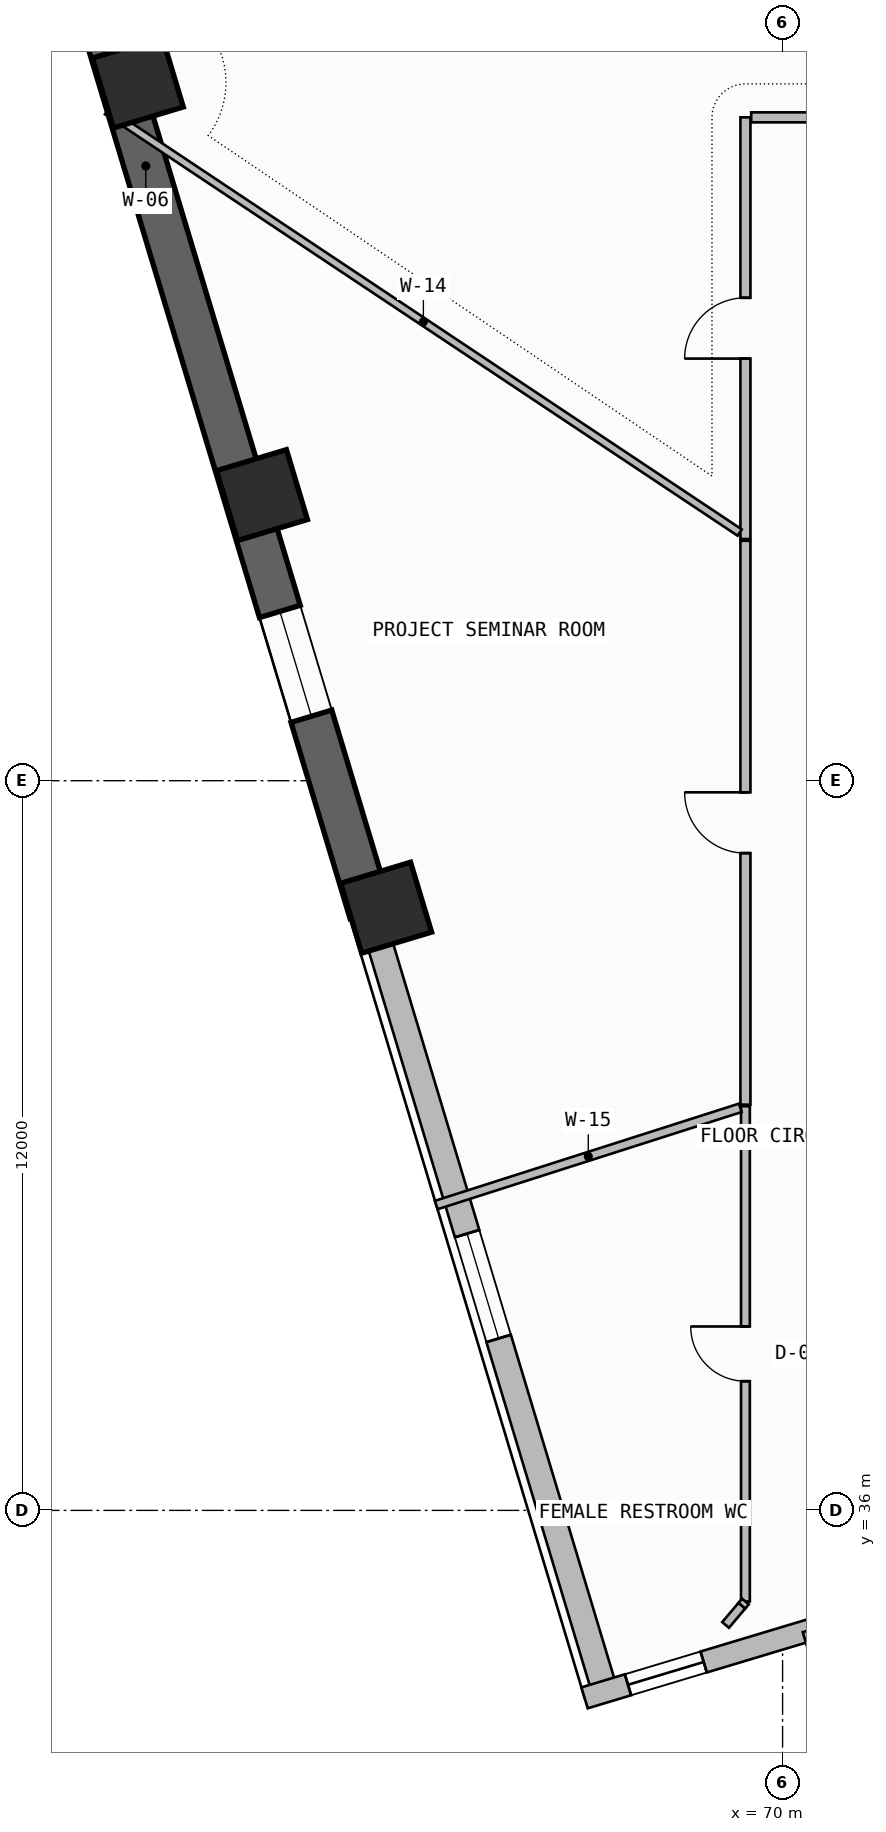
"""IFC4 building model, lengths in metres.
Left out: names, types, materials, properties, quantities, classifications, styles, units other than length and angle.
Written with IfcOpenShell. Run it as: python <this file> out.ifc"""

import sys

from ifc_helpers import new_model, si_unit, direction, frame, frame_2d, origin, origin_2d, place, context, subcontext, project, spatial, rectangle, extrude, element, fill, save


model = new_model("IFC4")
c1 = context("Model", 3, precision=1e-05, world=origin(), true_north=direction((0.0, 1.0)))
c2 = subcontext(c1, "Body", "Model", "MODEL_VIEW")
j1 = project(units=[si_unit("LENGTHUNIT", "METRE"), si_unit("PLANEANGLEUNIT", "RADIAN")], contexts=[c1])
p1 = place(None, origin())
s1 = spatial("IfcSite", under=j1, at=p1, CompositionType="ELEMENT")
p2 = place(p1, origin())
s2 = spatial("IfcBuilding", under=s1, at=p2, CompositionType="ELEMENT")
p3 = place(p2, frame((0.0, 0.0, 135.9)))
s3 = spatial("IfcBuildingStorey", under=s2, at=p3, CompositionType="ELEMENT", Elevation=135.9)
for number, where, z_axis, x_axis in (
    (1, (59.396, 59.481, 0.0), (0.0, 0.0, 1.0), (-0.288, 0.958, 0.0)),
    (2, (61.438, 52.696, 0.0), (0.0, 0.0, 1.0), (-0.288, 0.958, 0.0)),
    (3, (63.48, 45.912, 0.0), (0.0, 0.0, 1.0), (-0.288, 0.958, 0.0)),
):
    element("IfcColumn", number, at=place(p3, frame(where, z_axis=z_axis, x_axis=x_axis)), inside=s3, PredefinedType="COLUMN", context=c2, shape_type="SweptSolid", body=[
        extrude(rectangle(XDim=1.2, YDim=1.2, at=origin_2d()), origin(), (0.0, 0.0, 1.0), 3.6),
    ])
p4 = place(p3, frame((57.323, 65.434, -0.26), z_axis=(0.0, 0.0, 1.0), x_axis=(0.288188159352, -0.957573801234, 0.0)))
e4 = element("IfcWall", 4, at=p4, inside=s3, PredefinedType="SHEAR", context=c2, shape_type="SweptSolid", body=[
    extrude(rectangle(XDim=20.469, YDim=0.7, at=frame_2d((10.234, 0.0))), origin(), (0.0, 0.0, 1.0), 3.6),
])
p5 = place(p4, frame((15.3, 0.0, 1.2)))
e5 = element("IfcOpeningElement", 5, at=p5, cuts=e4, PredefinedType="OPENING", context=c2, shape_type="SweptSolid", body=[
    extrude(rectangle(XDim=1.8, YDim=0.9, at=frame_2d((0.9, 0.45))), frame((0.0, 0.36, 0.0), z_axis=(0.0, -1.0, 0.0), x_axis=(1.0, 0.0, 0.0)), (0.0, 0.0, 1.0), 0.72),
])
p6 = place(p3, frame((63.221, 45.834, 0.0), z_axis=(0.0, 0.0, 1.0), x_axis=(0.288202962273, -0.957569346072, 0.0)))
e6 = element("IfcWall", 6, at=p6, inside=s3, PredefinedType="SOLIDWALL", context=c2, shape_type="SweptSolid", body=[
    extrude(rectangle(XDim=13.384, YDim=0.42, at=frame_2d((6.692, 0.0))), origin(), (0.0, 0.0, 1.0), 2.725),
])
p7 = place(p6, frame((5.517, 0.0, 1.2)))
e7 = element("IfcOpeningElement", 7, at=p7, cuts=e6, PredefinedType="OPENING", context=c2, shape_type="SweptSolid", body=[
    extrude(rectangle(XDim=1.8, YDim=0.9, at=frame_2d((0.9, 0.45))), frame((0.0, 0.22, 0.0), z_axis=(0.0, -1.0, 0.0), x_axis=(1.0, 0.0, 0.0)), (0.0, 0.0, 1.0), 0.44),
])
p8 = place(p3, frame((66.743, 32.917, 0.0), z_axis=(0.0, 0.0, 1.0), x_axis=(0.957584687378, 0.288151985068, 0.0)))
e8 = element("IfcWall", 8, at=p8, inside=s3, PredefinedType="SOLIDWALL", context=c2, shape_type="SweptSolid", body=[
    extrude(rectangle(XDim=3.927, YDim=0.36, at=frame_2d((1.963, 0.0))), origin(), (0.0, 0.0, 1.0), 3.34),
])
p9 = place(p8, frame((0.746, 0.0, 0.45)))
e9 = element("IfcOpeningElement", 9, at=p9, cuts=e8, PredefinedType="OPENING", context=c2, shape_type="SweptSolid", body=[
    extrude(rectangle(XDim=1.3, YDim=2.4, at=frame_2d((0.65, 1.2))), frame((0.0, 0.19, 0.0), z_axis=(0.0, -1.0, 0.0), x_axis=(1.0, 0.0, 0.0)), (0.0, 0.0, 1.0), 0.38),
])
p10 = place(p3, frame((70.504, 34.049, 0.0), z_axis=(0.0, 0.0, 1.0), x_axis=(0.288169140251, -0.957579524952, 0.0)))
e10 = element("IfcWall", 10, at=p10, inside=s3, PredefinedType="SOLIDWALL", context=c2, shape_type="SweptSolid", body=[
    extrude(rectangle(XDim=3.927, YDim=0.36, at=frame_2d((1.963, 0.0))), origin(), (0.0, 0.0, 1.0), 3.34),
])
p11 = place(p3, frame((69.389, 42.647, 0.0), z_axis=(0.0, 0.0, 1.0), x_axis=(0.0, -1.0, 0.0)))
e11 = element("IfcWall", 11, at=p11, inside=s3, PredefinedType="PARTITIONING", context=c2, shape_type="SweptSolid", body=[
    extrude(rectangle(XDim=8.146, YDim=0.145, at=frame_2d((4.073, 0.0))), origin(), (0.0, 0.0, 1.0), 3.34),
])
p12 = place(p11, frame((3.623, 0.0, 0.0)))
e12 = element("IfcOpeningElement", 12, at=p12, cuts=e11, PredefinedType="OPENING", context=c2, shape_type="SweptSolid", body=[
    extrude(rectangle(XDim=0.9, YDim=2.1, at=frame_2d((0.45, 1.05))), frame((0.0, 0.083, 0.0), z_axis=(0.0, -1.0, 0.0), x_axis=(1.0, 0.0, 0.0)), (0.0, 0.0, 1.0), 0.165),
])
p13 = place(p3, frame((69.389, 34.502, 0.0), z_axis=(0.0, 0.0, 1.0), x_axis=(-0.647115916088, -0.762391625836, 0.0)))
e13 = element("IfcWall", 13, at=p13, inside=s3, PredefinedType="PARTITIONING", context=c2, shape_type="SweptSolid", body=[
    extrude(rectangle(XDim=0.093, YDim=0.145, at=frame_2d((0.047, 0.0))), origin(), (0.0, 0.0, 1.0), 3.34),
])
p14 = place(p3, frame((64.304, 41.022, 0.0), z_axis=(0.0, 0.0, 1.0), x_axis=(0.952513210201, 0.304497264999, 0.0)))
e14 = element("IfcWall", 14, at=p14, inside=s3, PredefinedType="PARTITIONING", context=c2, shape_type="SweptSolid", body=[
    extrude(rectangle(XDim=5.249, YDim=0.145, at=frame_2d((2.625, 0.0))), origin(), (0.0, 0.0, 1.0), 3.34),
])
p15 = place(p3, frame((73.012, 58.987, 0.0), z_axis=(0.0, 0.0, 1.0), x_axis=(-0.394910032607, 0.918719797406, 0.0)))
e15 = element("IfcWall", 15, at=p15, inside=s3, PredefinedType="PARTITIONING", context=c2, shape_type="SweptSolid", body=[
    extrude(rectangle(XDim=11.745, YDim=0.125, at=frame_2d((5.873, 0.0))), origin(), (0.0, 0.0, 1.0), 3.34),
])
p16 = place(p3, frame((69.389, 58.909, 0.0), z_axis=(0.0, 0.0, 1.0), x_axis=(0.0, -1.0, 0.0)))
e16 = element("IfcWall", 16, at=p16, inside=s3, PredefinedType="PARTITIONING", context=c2, shape_type="SweptSolid", body=[
    extrude(rectangle(XDim=6.935, YDim=0.165, at=frame_2d((3.467, 0.0))), origin(), (0.0, 0.0, 1.0), 2.725),
])
p17 = place(p16, frame((2.967, 0.0, 0.0)))
e17 = element("IfcOpeningElement", 17, at=p17, cuts=e16, PredefinedType="OPENING", context=c2, shape_type="SweptSolid", body=[
    extrude(rectangle(XDim=1.0, YDim=2.2, at=frame_2d((0.5, 1.1))), frame((0.0, 0.093, 0.0), z_axis=(0.0, -1.0, 0.0), x_axis=(1.0, 0.0, 0.0)), (0.0, 0.0, 1.0), 0.185),
])
p18 = place(p3, frame((72.986, 58.909, 0.0), z_axis=(0.0, 0.0, 1.0), x_axis=(-1.0, 0.0, 0.0)))
e18 = element("IfcWall", 18, at=p18, inside=s3, PredefinedType="PARTITIONING", context=c2, shape_type="SweptSolid", body=[
    extrude(rectangle(XDim=3.503, YDim=0.165, at=frame_2d((1.751, 0.0))), origin(), (0.0, 0.0, 1.0), 2.725),
])
p19 = place(p3, frame((69.294, 52.081, 0.0), z_axis=(0.0, 0.0, 1.0), x_axis=(-0.832263553601, 0.554380174021, 0.0)))
e19 = element("IfcWall", 19, at=p19, inside=s3, PredefinedType="PARTITIONING", context=c2, shape_type="SweptSolid", body=[
    extrude(rectangle(XDim=12.501, YDim=0.125, at=frame_2d((6.25, 0.0))), origin(), (0.0, 0.0, 1.0), 2.725),
])
p20 = place(p3, frame((69.389, 51.945, 0.0), z_axis=(0.0, 0.0, 1.0), x_axis=(0.0, -1.0, 0.0)))
e20 = element("IfcWall", 20, at=p20, inside=s3, PredefinedType="PARTITIONING", context=c2, shape_type="SweptSolid", body=[
    extrude(rectangle(XDim=9.273, YDim=0.165, at=frame_2d((4.636, 0.0))), origin(), (0.0, 0.0, 1.0), 2.725),
])
p21 = place(p20, frame((4.136, 0.0, 0.0)))
e21 = element("IfcOpeningElement", 21, at=p21, cuts=e20, PredefinedType="OPENING", context=c2, shape_type="SweptSolid", body=[
    extrude(rectangle(XDim=1.0, YDim=2.2, at=frame_2d((0.5, 1.1))), frame((0.0, 0.093, 0.0), z_axis=(0.0, -1.0, 0.0), x_axis=(1.0, 0.0, 0.0)), (0.0, 0.0, 1.0), 0.185),
])
p22 = place(p3, frame((69.329, 34.431, 0.0), z_axis=(0.0, 0.0, 1.0), x_axis=(-0.645942241466, -0.763386285369, 0.0)))
e22 = element("IfcWall", 22, at=p22, inside=s3, PredefinedType="PARTITIONING", context=c2, shape_type="SweptSolid", body=[
    extrude(rectangle(XDim=0.412, YDim=0.145, at=frame_2d((0.206, 0.0))), origin(), (0.0, 0.0, 1.0), 3.34),
])
p23 = place(p5, origin())
e23 = element("IfcWindow", 23, at=p23, inside=s3, PartitioningType="SINGLE_PANEL", PredefinedType="WINDOW", context=c2, shape_type="SweptSolid", body=[
    extrude(rectangle(XDim=1.8, YDim=0.9, at=frame_2d((0.9, 0.45))), frame((0.0, 0.03, 0.0), z_axis=(0.0, -1.0, 0.0), x_axis=(1.0, 0.0, 0.0)), (0.0, 0.0, 1.0), 0.06),
])
fill(e5, e23)
p24 = place(p7, origin())
e24 = element("IfcWindow", 24, at=p24, inside=s3, PartitioningType="SINGLE_PANEL", PredefinedType="WINDOW", context=c2, shape_type="SweptSolid", body=[
    extrude(rectangle(XDim=1.8, YDim=0.9, at=frame_2d((0.9, 0.45))), frame((0.0, 0.03, 0.0), z_axis=(0.0, -1.0, 0.0), x_axis=(1.0, 0.0, 0.0)), (0.0, 0.0, 1.0), 0.06),
])
fill(e7, e24)
p25 = place(p9, origin())
e25 = element("IfcWindow", 25, at=p25, inside=s3, PartitioningType="SINGLE_PANEL", PredefinedType="WINDOW", context=c2, shape_type="SweptSolid", body=[
    extrude(rectangle(XDim=1.3, YDim=2.4, at=frame_2d((0.65, 1.2))), frame((0.0, 0.03, 0.0), z_axis=(0.0, -1.0, 0.0), x_axis=(1.0, 0.0, 0.0)), (0.0, 0.0, 1.0), 0.06),
])
fill(e9, e25)
p26 = place(p12, frame((0.9, 0.0, 0.0), z_axis=(0.0, 0.0, 1.0), x_axis=(-1.0, 0.0, 0.0)))
e26 = element("IfcDoor", 26, at=p26, inside=s3, OperationType="SINGLE_SWING_RIGHT", PredefinedType="DOOR", context=c2, shape_type="SweptSolid", body=[
    extrude(rectangle(XDim=0.9, YDim=2.1, at=frame_2d((0.45, 1.05))), frame((0.0, 0.025, 0.0), z_axis=(0.0, -1.0, 0.0), x_axis=(1.0, 0.0, 0.0)), (0.0, 0.0, 1.0), 0.05),
])
fill(e12, e26)
p27 = place(p17, frame((1.0, 0.0, 0.0), z_axis=(0.0, 0.0, 1.0), x_axis=(-1.0, 0.0, 0.0)))
e27 = element("IfcDoor", 27, at=p27, inside=s3, OperationType="SINGLE_SWING_LEFT", PredefinedType="DOOR", context=c2, shape_type="SweptSolid", body=[
    extrude(rectangle(XDim=1.0, YDim=2.2, at=frame_2d((0.5, 1.1))), frame((0.0, 0.025, 0.0), z_axis=(0.0, -1.0, 0.0), x_axis=(1.0, 0.0, 0.0)), (0.0, 0.0, 1.0), 0.05),
])
fill(e17, e27)
p28 = place(p21, frame((1.0, 0.0, 0.0), z_axis=(0.0, 0.0, 1.0), x_axis=(-1.0, 0.0, 0.0)))
e28 = element("IfcDoor", 28, at=p28, inside=s3, OperationType="SINGLE_SWING_RIGHT", PredefinedType="DOOR", context=c2, shape_type="SweptSolid", body=[
    extrude(rectangle(XDim=1.0, YDim=2.2, at=frame_2d((0.5, 1.1))), frame((0.0, 0.025, 0.0), z_axis=(0.0, -1.0, 0.0), x_axis=(1.0, 0.0, 0.0)), (0.0, 0.0, 1.0), 0.05),
])
fill(e21, e28)
save(model, sys.argv[1])
